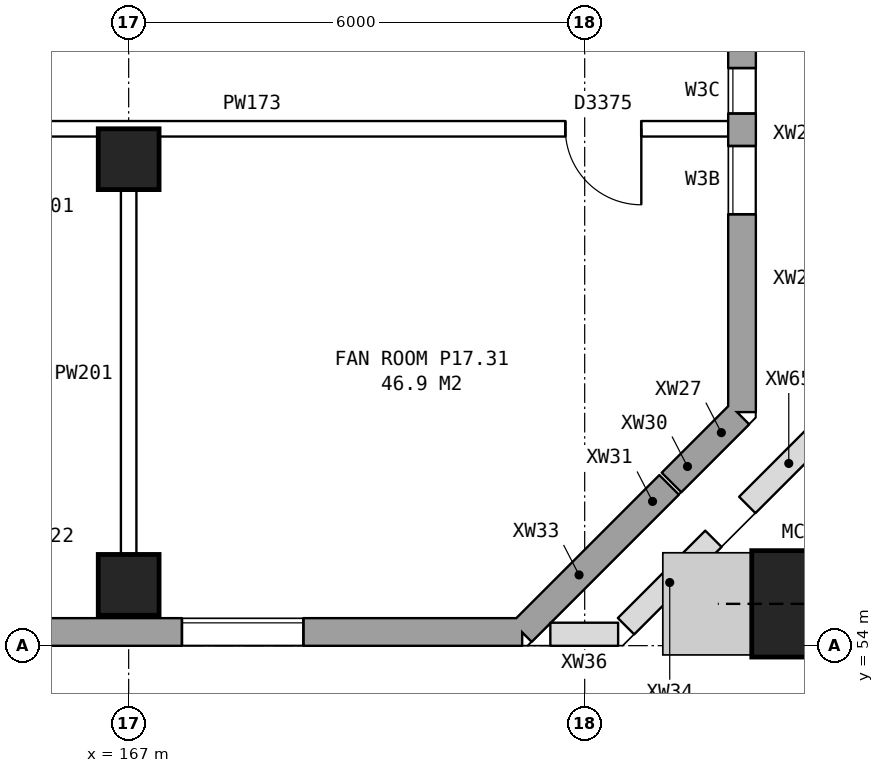
"""IFC4 building model, lengths in metres.
Left out: names, types, materials, properties, quantities, classifications, styles, units other than length and angle.
Written with IfcOpenShell. Run it as: python <this file> out.ifc"""

import sys

from ifc_helpers import new_model, si_unit, direction, frame, frame_2d, origin, origin_2d, place, context, subcontext, project, spatial, rectangle, hollow_rectangle, extrude, element, fill, save


model = new_model("IFC4")
c1 = context("Model", 3, precision=1e-05, world=origin(), true_north=direction((0.0, 1.0)))
c2 = subcontext(c1, "Body", "Model", "MODEL_VIEW")
j1 = project(units=[si_unit("LENGTHUNIT", "METRE"), si_unit("PLANEANGLEUNIT", "RADIAN")], contexts=[c1])
p1 = place(None, origin())
s1 = spatial("IfcSite", under=j1, at=p1, CompositionType="ELEMENT")
p2 = place(p1, origin())
s2 = spatial("IfcBuilding", under=s1, at=p2, CompositionType="ELEMENT")
p3 = place(p2, frame((0.0, 0.0, 62.9)))
s3 = spatial("IfcBuildingStorey", under=s2, at=p3, CompositionType="ELEMENT", Elevation=62.9)
for number, where, z_axis, x_axis in (
    (1, (167.0, 54.8, 0.0), (0.0, 0.0, 1.0), (1.0, 0.0, 0.0)),
    (2, (167.0, 60.4, 0.0), (0.0, 0.0, 1.0), (1.0, 0.0, 0.0)),
):
    element("IfcColumn", number, at=place(p3, frame(where, z_axis=z_axis, x_axis=x_axis)), inside=s3, PredefinedType="COLUMN", context=c2, shape_type="SweptSolid", body=[
        extrude(rectangle(XDim=0.8, YDim=0.8, at=origin_2d()), origin(), (0.0, 0.0, 1.0), 4.2),
    ])
p4 = place(p3, frame((175.898, 54.55, 0.188), z_axis=(-0.267664450709, 0.0, 0.963512190803), x_axis=(0.0, -1.0, 0.0)))
e3 = element("IfcColumn", 3, at=p4, inside=s3, PredefinedType="COLUMN", context=c2, shape_type="SweptSolid", body=[
    extrude(hollow_rectangle(XDim=1.4, YDim=1.4, WallThickness=0.075, at=origin_2d()), origin(), (0.0, 0.0, 1.0), 4.281),
])
p5 = place(p3, frame((134.075, 54.18, 0.0), z_axis=(0.0, 0.0, 1.0), x_axis=(1.0, 0.0, 0.0)))
e4 = element("IfcWall", 4, at=p5, inside=s3, PredefinedType="STANDARD", context=c2, shape_type="SweptSolid", body=[
    extrude(rectangle(XDim=38.101, YDim=0.36, at=frame_2d((19.05, 0.0))), origin(), (0.0, 0.0, 1.0), 4.2),
])
p6 = place(p5, frame((3.625, 0.0, 1.5)))
e5 = element("IfcOpeningElement", 5, at=p6, cuts=e4, PredefinedType="OPENING", context=c2, shape_type="SweptSolid", body=[
    extrude(rectangle(XDim=1.6, YDim=1.2, at=frame_2d((0.8, 0.6))), frame((0.0, 0.19, 0.0), z_axis=(0.0, -1.0, 0.0), x_axis=(1.0, 0.0, 0.0)), (0.0, 0.0, 1.0), 0.38),
])
p7 = place(p5, frame((7.725, 0.0, 1.5)))
e6 = element("IfcOpeningElement", 6, at=p7, cuts=e4, PredefinedType="OPENING", context=c2, shape_type="SweptSolid", body=[
    extrude(rectangle(XDim=0.9, YDim=1.2, at=frame_2d((0.45, 0.6))), frame((0.0, 0.19, 0.0), z_axis=(0.0, -1.0, 0.0), x_axis=(1.0, 0.0, 0.0)), (0.0, 0.0, 1.0), 0.38),
])
p8 = place(p5, frame((9.625, 0.0, 1.5)))
e7 = element("IfcOpeningElement", 7, at=p8, cuts=e4, PredefinedType="OPENING", context=c2, shape_type="SweptSolid", body=[
    extrude(rectangle(XDim=1.6, YDim=1.2, at=frame_2d((0.8, 0.6))), frame((0.0, 0.19, 0.0), z_axis=(0.0, -1.0, 0.0), x_axis=(1.0, 0.0, 0.0)), (0.0, 0.0, 1.0), 0.38),
])
p9 = place(p5, frame((11.525, 0.0, 1.5)))
e8 = element("IfcOpeningElement", 8, at=p9, cuts=e4, PredefinedType="OPENING", context=c2, shape_type="SweptSolid", body=[
    extrude(rectangle(XDim=0.9, YDim=1.2, at=frame_2d((0.45, 0.6))), frame((0.0, 0.19, 0.0), z_axis=(0.0, -1.0, 0.0), x_axis=(1.0, 0.0, 0.0)), (0.0, 0.0, 1.0), 0.38),
])
p10 = place(p5, frame((15.625, 0.0, 1.5)))
e9 = element("IfcOpeningElement", 9, at=p10, cuts=e4, PredefinedType="OPENING", context=c2, shape_type="SweptSolid", body=[
    extrude(rectangle(XDim=1.6, YDim=1.2, at=frame_2d((0.8, 0.6))), frame((0.0, 0.19, 0.0), z_axis=(0.0, -1.0, 0.0), x_axis=(1.0, 0.0, 0.0)), (0.0, 0.0, 1.0), 0.38),
])
p11 = place(p5, frame((21.625, 0.0, 1.5)))
e10 = element("IfcOpeningElement", 10, at=p11, cuts=e4, PredefinedType="OPENING", context=c2, shape_type="SweptSolid", body=[
    extrude(rectangle(XDim=1.6, YDim=1.2, at=frame_2d((0.8, 0.6))), frame((0.0, 0.19, 0.0), z_axis=(0.0, -1.0, 0.0), x_axis=(1.0, 0.0, 0.0)), (0.0, 0.0, 1.0), 0.38),
])
p12 = place(p5, frame((23.525, 0.0, 1.5)))
e11 = element("IfcOpeningElement", 11, at=p12, cuts=e4, PredefinedType="OPENING", context=c2, shape_type="SweptSolid", body=[
    extrude(rectangle(XDim=1.6, YDim=1.2, at=frame_2d((0.8, 0.6))), frame((0.0, 0.19, 0.0), z_axis=(0.0, -1.0, 0.0), x_axis=(1.0, 0.0, 0.0)), (0.0, 0.0, 1.0), 0.38),
])
p13 = place(p5, frame((28.075, 0.0, 1.5)))
e12 = element("IfcOpeningElement", 12, at=p13, cuts=e4, PredefinedType="OPENING", context=c2, shape_type="SweptSolid", body=[
    extrude(rectangle(XDim=0.6, YDim=1.2, at=frame_2d((0.3, 0.6))), frame((0.0, 0.19, 0.0), z_axis=(0.0, -1.0, 0.0), x_axis=(1.0, 0.0, 0.0)), (0.0, 0.0, 1.0), 0.38),
])
p14 = place(p5, frame((28.975, 0.0, 1.5)))
e13 = element("IfcOpeningElement", 13, at=p14, cuts=e4, PredefinedType="OPENING", context=c2, shape_type="SweptSolid", body=[
    extrude(rectangle(XDim=1.2, YDim=1.2, at=frame_2d((0.6, 0.6))), frame((0.0, 0.19, 0.0), z_axis=(0.0, -1.0, 0.0), x_axis=(1.0, 0.0, 0.0)), (0.0, 0.0, 1.0), 0.38),
])
p15 = place(p5, frame((33.625, 0.0, 1.5)))
e14 = element("IfcOpeningElement", 14, at=p15, cuts=e4, PredefinedType="OPENING", context=c2, shape_type="SweptSolid", body=[
    extrude(rectangle(XDim=1.6, YDim=1.2, at=frame_2d((0.8, 0.6))), frame((0.0, 0.19, 0.0), z_axis=(0.0, -1.0, 0.0), x_axis=(1.0, 0.0, 0.0)), (0.0, 0.0, 1.0), 0.38),
])
p16 = place(p3, frame((172.175, 54.18, 0.0), z_axis=(0.0, 0.0, 1.0), x_axis=(0.707106781187, 0.707106781187, 0.0)))
e15 = element("IfcWall", 15, at=p16, inside=s3, PredefinedType="STANDARD", context=c2, shape_type="SweptSolid", body=[
    extrude(rectangle(XDim=2.122, YDim=0.36, at=frame_2d((1.061, 0.0))), origin(), (0.0, 0.0, 1.0), 4.2),
])
p17 = place(p3, frame((173.676, 55.681, 0.0), z_axis=(0.0, 0.0, 1.0), x_axis=(0.707106781187, 0.707106781187, 0.0)))
e16 = element("IfcWall", 16, at=p17, inside=s3, PredefinedType="STANDARD", context=c2, shape_type="SweptSolid", body=[
    extrude(rectangle(XDim=0.613, YDim=0.36, at=frame_2d((0.307, 0.0))), origin(), (0.0, 0.0, 1.0), 3.397),
])
p18 = place(p3, frame((174.144, 56.148, 0.953), z_axis=(0.0, 0.0, 1.0), x_axis=(0.706900055054, 0.707313446899, 0.0)))
e17 = element("IfcWall", 17, at=p18, inside=s3, PredefinedType="STANDARD", context=c2, shape_type="SweptSolid", body=[
    extrude(rectangle(XDim=0.591, YDim=0.36, at=frame_2d((0.295, 0.0))), origin(), (0.0, 0.0, 1.0), 3.247),
])
p19 = place(p3, frame((174.561, 56.566, 0.0), z_axis=(0.0, 0.0, 1.0), x_axis=(0.707106781187, 0.707106781187, 0.0)))
e18 = element("IfcWall", 18, at=p19, inside=s3, PredefinedType="STANDARD", context=c2, shape_type="SweptSolid", body=[
    extrude(rectangle(XDim=0.669, YDim=0.36, at=frame_2d((0.335, 0.0))), origin(), (0.0, 0.0, 1.0), 4.2),
])
p20 = place(p3, frame((175.07, 57.075, 0.0), z_axis=(0.0, 0.0, 1.0), x_axis=(0.0, 1.0, 0.0)))
e19 = element("IfcWall", 19, at=p20, inside=s3, PredefinedType="STANDARD", context=c2, shape_type="SweptSolid", body=[
    extrude(rectangle(XDim=25.851, YDim=0.36, at=frame_2d((12.925, 0.0))), origin(), (0.0, 0.0, 1.0), 4.2),
])
p21 = place(p20, frame((2.6, 0.0, 1.5)))
e20 = element("IfcOpeningElement", 20, at=p21, cuts=e19, PredefinedType="OPENING", context=c2, shape_type="SweptSolid", body=[
    extrude(rectangle(XDim=0.9, YDim=1.2, at=frame_2d((0.45, 0.6))), frame((0.0, 0.19, 0.0), z_axis=(0.0, -1.0, 0.0), x_axis=(1.0, 0.0, 0.0)), (0.0, 0.0, 1.0), 0.38),
])
p22 = place(p20, frame((3.925, 0.0, 1.5)))
e21 = element("IfcOpeningElement", 21, at=p22, cuts=e19, PredefinedType="OPENING", context=c2, shape_type="SweptSolid", body=[
    extrude(rectangle(XDim=0.6, YDim=1.2, at=frame_2d((0.3, 0.6))), frame((0.0, 0.19, 0.0), z_axis=(0.0, -1.0, 0.0), x_axis=(1.0, 0.0, 0.0)), (0.0, 0.0, 1.0), 0.38),
])
p23 = place(p20, frame((7.625, 0.0, 1.5)))
e22 = element("IfcOpeningElement", 22, at=p23, cuts=e19, PredefinedType="OPENING", context=c2, shape_type="SweptSolid", body=[
    extrude(rectangle(XDim=1.6, YDim=1.2, at=frame_2d((0.8, 0.6))), frame((0.0, 0.19, 0.0), z_axis=(0.0, -1.0, 0.0), x_axis=(1.0, 0.0, 0.0)), (0.0, 0.0, 1.0), 0.38),
])
p24 = place(p20, frame((10.625, 0.0, 1.5)))
e23 = element("IfcOpeningElement", 23, at=p24, cuts=e19, PredefinedType="OPENING", context=c2, shape_type="SweptSolid", body=[
    extrude(rectangle(XDim=1.6, YDim=1.2, at=frame_2d((0.8, 0.6))), frame((0.0, 0.19, 0.0), z_axis=(0.0, -1.0, 0.0), x_axis=(1.0, 0.0, 0.0)), (0.0, 0.0, 1.0), 0.38),
])
p25 = place(p20, frame((9.525, 0.0, 1.5)))
e24 = element("IfcOpeningElement", 24, at=p25, cuts=e19, PredefinedType="OPENING", context=c2, shape_type="SweptSolid", body=[
    extrude(rectangle(XDim=0.6, YDim=1.2, at=frame_2d((0.3, 0.6))), frame((0.0, 0.19, 0.0), z_axis=(0.0, -1.0, 0.0), x_axis=(1.0, 0.0, 0.0)), (0.0, 0.0, 1.0), 0.38),
])
p26 = place(p20, frame((14.975, 0.0, 1.5)))
e25 = element("IfcOpeningElement", 25, at=p26, cuts=e19, PredefinedType="OPENING", context=c2, shape_type="SweptSolid", body=[
    extrude(rectangle(XDim=0.6, YDim=1.2, at=frame_2d((0.3, 0.6))), frame((0.0, 0.19, 0.0), z_axis=(0.0, -1.0, 0.0), x_axis=(1.0, 0.0, 0.0)), (0.0, 0.0, 1.0), 0.38),
])
p27 = place(p20, frame((19.625, 0.0, 1.5)))
e26 = element("IfcOpeningElement", 26, at=p27, cuts=e19, PredefinedType="OPENING", context=c2, shape_type="SweptSolid", body=[
    extrude(rectangle(XDim=1.6, YDim=1.2, at=frame_2d((0.8, 0.6))), frame((0.0, 0.19, 0.0), z_axis=(0.0, -1.0, 0.0), x_axis=(1.0, 0.0, 0.0)), (0.0, 0.0, 1.0), 0.38),
])
p28 = place(p20, frame((22.625, 0.0, 1.5)))
e27 = element("IfcOpeningElement", 27, at=p28, cuts=e19, PredefinedType="OPENING", context=c2, shape_type="SweptSolid", body=[
    extrude(rectangle(XDim=1.6, YDim=1.2, at=frame_2d((0.8, 0.6))), frame((0.0, 0.19, 0.0), z_axis=(0.0, -1.0, 0.0), x_axis=(1.0, 0.0, 0.0)), (0.0, 0.0, 1.0), 0.38),
])
p29 = place(p20, frame((15.875, 0.0, 1.5)))
e28 = element("IfcOpeningElement", 28, at=p29, cuts=e19, PredefinedType="OPENING", context=c2, shape_type="SweptSolid", body=[
    extrude(rectangle(XDim=1.2, YDim=1.2, at=frame_2d((0.6, 0.6))), frame((0.0, 0.19, 0.0), z_axis=(0.0, -1.0, 0.0), x_axis=(1.0, 0.0, 0.0)), (0.0, 0.0, 1.0), 0.38),
])
p30 = place(p3, frame((172.55, 54.15, 0.0), z_axis=(0.0, 0.0, 1.0), x_axis=(1.0, 0.0, 0.0)))
e29 = element("IfcWall", 29, at=p30, inside=s3, PredefinedType="PARAPET", context=c2, shape_type="SweptSolid", body=[
    extrude(rectangle(XDim=0.888, YDim=0.3, at=frame_2d((0.444, 0.0))), origin(), (0.0, 0.0, 1.0), 1.1),
])
p31 = place(p3, frame((173.545, 54.258, 0.0), z_axis=(0.0, 0.0, 1.0), x_axis=(0.707106781187, 0.707106781187, 0.0)))
e30 = element("IfcWall", 30, at=p31, inside=s3, PredefinedType="PARAPET", context=c2, shape_type="SweptSolid", body=[
    extrude(rectangle(XDim=1.622, YDim=0.3, at=frame_2d((0.811, 0.0))), origin(), (0.0, 0.0, 1.0), 1.1),
])
p32 = place(p3, frame((175.141, 55.853, 0.0), z_axis=(0.0, 0.0, 1.0), x_axis=(0.70702751357, 0.707186039918, 0.0)))
e31 = element("IfcWall", 31, at=p32, inside=s3, PredefinedType="PARAPET", context=c2, shape_type="SweptSolid", body=[
    extrude(rectangle(XDim=1.54, YDim=0.3, at=frame_2d((0.77, 0.0))), origin(), (0.0, 0.0, 1.0), 1.1),
])
p33 = place(p3, frame((131.24, 60.8, 0.0), z_axis=(0.0, 0.0, 1.0), x_axis=(1.0, 0.0, 0.0)))
e32 = element("IfcWall", 32, at=p33, inside=s3, PredefinedType="PARTITIONING", context=c2, shape_type="SweptSolid", body=[
    extrude(rectangle(XDim=43.77, YDim=0.2, at=frame_2d((21.885, 0.0))), origin(), (0.0, 0.0, 1.0), 4.2),
])
p34 = place(p33, frame((2.44, 0.0, 0.0)))
e33 = element("IfcOpeningElement", 33, at=p34, cuts=e32, PredefinedType="OPENING", context=c2, shape_type="SweptSolid", body=[
    extrude(rectangle(XDim=1.0, YDim=2.1, at=frame_2d((0.5, 1.05))), frame((0.0, 0.11, 0.0), z_axis=(0.0, -1.0, 0.0), x_axis=(1.0, 0.0, 0.0)), (0.0, 0.0, 1.0), 0.22),
])
p35 = place(p33, frame((8.26, 0.0, 0.0)))
e34 = element("IfcOpeningElement", 34, at=p35, cuts=e32, PredefinedType="OPENING", context=c2, shape_type="SweptSolid", body=[
    extrude(rectangle(XDim=1.0, YDim=2.1, at=frame_2d((0.5, 1.05))), frame((0.0, 0.11, 0.0), z_axis=(0.0, -1.0, 0.0), x_axis=(1.0, 0.0, 0.0)), (0.0, 0.0, 1.0), 0.22),
])
p36 = place(p33, frame((14.26, 0.0, 0.0)))
e35 = element("IfcOpeningElement", 35, at=p36, cuts=e32, PredefinedType="OPENING", context=c2, shape_type="SweptSolid", body=[
    extrude(rectangle(XDim=1.0, YDim=2.1, at=frame_2d((0.5, 1.05))), frame((0.0, 0.11, 0.0), z_axis=(0.0, -1.0, 0.0), x_axis=(1.0, 0.0, 0.0)), (0.0, 0.0, 1.0), 0.22),
])
p37 = place(p33, frame((20.26, 0.0, 0.0)))
e36 = element("IfcOpeningElement", 36, at=p37, cuts=e32, PredefinedType="OPENING", context=c2, shape_type="SweptSolid", body=[
    extrude(rectangle(XDim=1.0, YDim=2.1, at=frame_2d((0.5, 1.05))), frame((0.0, 0.11, 0.0), z_axis=(0.0, -1.0, 0.0), x_axis=(1.0, 0.0, 0.0)), (0.0, 0.0, 1.0), 0.22),
])
p38 = place(p33, frame((26.26, 0.0, 0.0)))
e37 = element("IfcOpeningElement", 37, at=p38, cuts=e32, PredefinedType="OPENING", context=c2, shape_type="SweptSolid", body=[
    extrude(rectangle(XDim=1.0, YDim=2.1, at=frame_2d((0.5, 1.05))), frame((0.0, 0.11, 0.0), z_axis=(0.0, -1.0, 0.0), x_axis=(1.0, 0.0, 0.0)), (0.0, 0.0, 1.0), 0.22),
])
p39 = place(p33, frame((32.26, 0.0, 0.0)))
e38 = element("IfcOpeningElement", 38, at=p39, cuts=e32, PredefinedType="OPENING", context=c2, shape_type="SweptSolid", body=[
    extrude(rectangle(XDim=1.0, YDim=2.1, at=frame_2d((0.5, 1.05))), frame((0.0, 0.11, 0.0), z_axis=(0.0, -1.0, 0.0), x_axis=(1.0, 0.0, 0.0)), (0.0, 0.0, 1.0), 0.22),
])
p40 = place(p33, frame((41.505, 0.0, 0.0)))
e39 = element("IfcOpeningElement", 39, at=p40, cuts=e32, PredefinedType="OPENING", context=c2, shape_type="SweptSolid", body=[
    extrude(rectangle(XDim=1.0, YDim=2.1, at=frame_2d((0.5, 1.05))), frame((0.0, 0.11, 0.0), z_axis=(0.0, -1.0, 0.0), x_axis=(1.0, 0.0, 0.0)), (0.0, 0.0, 1.0), 0.22),
])
p41 = place(p3, frame((167.0, 54.24, 0.0), z_axis=(0.0, 0.0, 1.0), x_axis=(0.0, 1.0, 0.0)))
e40 = element("IfcWall", 40, at=p41, inside=s3, PredefinedType="PARTITIONING", context=c2, shape_type="SweptSolid", body=[
    extrude(rectangle(XDim=6.66, YDim=0.2, at=frame_2d((3.33, 0.0))), origin(), (0.0, 0.0, 1.0), 4.2),
])
p42 = place(p15, origin())
e41 = element("IfcWindow", 41, at=p42, inside=s3, PartitioningType="DOUBLE_PANEL_HORIZONTAL", PredefinedType="WINDOW", context=c2, shape_type="SweptSolid", body=[
    extrude(rectangle(XDim=1.6, YDim=1.2, at=frame_2d((0.8, 0.6))), frame((0.0, 0.15, 0.0), z_axis=(0.0, -1.0, 0.0), x_axis=(1.0, 0.0, 0.0)), (0.0, 0.0, 1.0), 0.06),
])
fill(e14, e41)
p43 = place(p21, origin())
e42 = element("IfcWindow", 42, at=p43, inside=s3, PartitioningType="DOUBLE_PANEL_HORIZONTAL", PredefinedType="WINDOW", context=c2, shape_type="SweptSolid", body=[
    extrude(rectangle(XDim=0.9, YDim=1.2, at=frame_2d((0.45, 0.6))), frame((0.0, 0.15, 0.0), z_axis=(0.0, -1.0, 0.0), x_axis=(1.0, 0.0, 0.0)), (0.0, 0.0, 1.0), 0.06),
])
fill(e20, e42)
p44 = place(p22, origin())
e43 = element("IfcWindow", 43, at=p44, inside=s3, PartitioningType="DOUBLE_PANEL_HORIZONTAL", PredefinedType="WINDOW", context=c2, shape_type="SweptSolid", body=[
    extrude(rectangle(XDim=0.6, YDim=1.2, at=frame_2d((0.3, 0.6))), frame((0.0, 0.15, 0.0), z_axis=(0.0, -1.0, 0.0), x_axis=(1.0, 0.0, 0.0)), (0.0, 0.0, 1.0), 0.06),
])
fill(e21, e43)
p45 = place(p40, frame((1.0, 0.0, 0.0), z_axis=(0.0, 0.0, 1.0), x_axis=(-1.0, 0.0, 0.0)))
e44 = element("IfcDoor", 44, at=p45, inside=s3, OperationType="SINGLE_SWING_LEFT", PredefinedType="DOOR", context=c2, shape_type="SweptSolid", body=[
    extrude(rectangle(XDim=1.0, YDim=2.1, at=frame_2d((0.5, 1.05))), frame((0.0, 0.025, 0.0), z_axis=(0.0, -1.0, 0.0), x_axis=(1.0, 0.0, 0.0)), (0.0, 0.0, 1.0), 0.05),
])
fill(e39, e44)
save(model, sys.argv[1])
